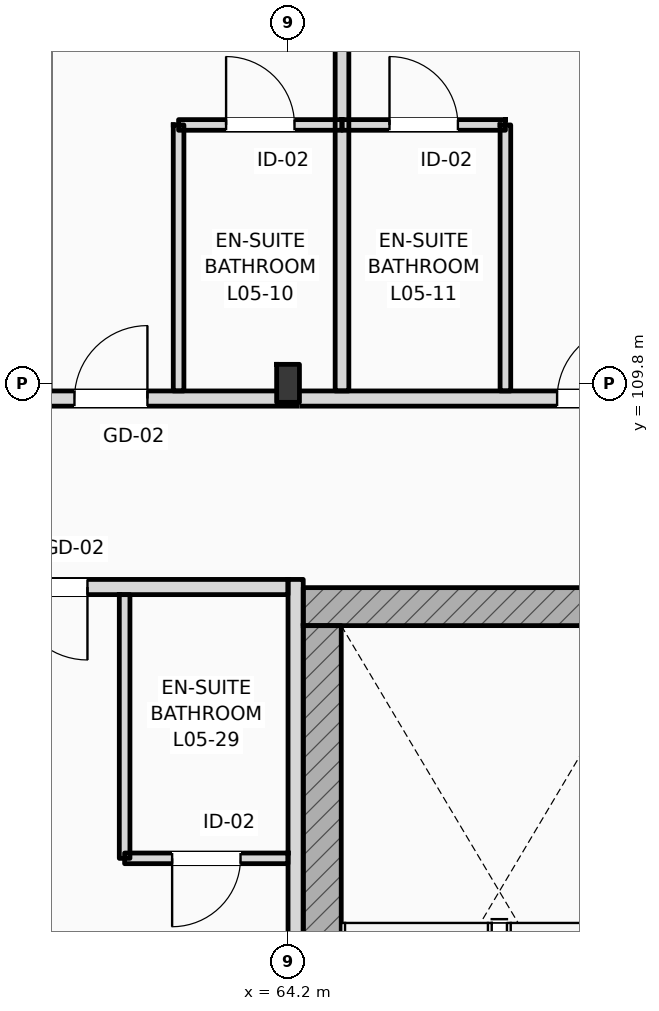
"""IFC4 building model, lengths in metres.
Left out: names, types, materials, properties, quantities, classifications, styles, units other than length and angle.
Written with IfcOpenShell. Run it as: python <this file> out.ifc"""

import sys

from ifc_helpers import new_model, si_unit, direction, frame, frame_2d, origin, origin_2d, place, context, subcontext, project, spatial, rectangle, i_section, extrude, element, fill, save


model = new_model("IFC4")
c1 = context("Model", 3, precision=1e-05, world=origin(), true_north=direction((0.0, 1.0)))
c2 = subcontext(c1, "Body", "Model", "MODEL_VIEW")
j1 = project(units=[si_unit("LENGTHUNIT", "METRE"), si_unit("PLANEANGLEUNIT", "RADIAN")], contexts=[c1])
p1 = place(None, origin())
s1 = spatial("IfcSite", under=j1, at=p1, CompositionType="ELEMENT")
p2 = place(p1, origin())
s2 = spatial("IfcBuilding", under=s1, at=p2, CompositionType="ELEMENT")
p3 = place(p2, frame((0.0, 0.0, 24.6)))
s3 = spatial("IfcBuildingStorey", under=s2, at=p3, CompositionType="ELEMENT", Elevation=24.6)
p4 = place(p3, frame((64.2, 109.8, 0.0), z_axis=(0.0, 0.0, 1.0), x_axis=(1.0, 0.0, 0.0)))
e1 = element("IfcColumn", 1, at=p4, inside=s3, PredefinedType="COLUMN", context=c2, shape_type="SweptSolid", body=[
    extrude(i_section(OverallWidth=0.3, OverallDepth=0.5, WebThickness=0.014, FlangeThickness=0.028, FilletRadius=0.027, at=origin_2d()), origin(), (0.0, 0.0, 1.0), 3.6),
])
p5 = place(p3, frame((64.4, 106.862, 0.0), z_axis=(0.0, 0.0, 1.0), x_axis=(1.0, 0.0, 0.0)))
e2 = element("IfcWall", 2, at=p5, inside=s3, PredefinedType="SHEAR", context=c2, shape_type="SweptSolid", body=[
    extrude(rectangle(XDim=5.16, YDim=0.5, at=frame_2d((2.58, 0.0))), origin(), (0.0, 0.0, 1.0), 3.6),
])
p6 = place(p3, frame((64.65, 97.5, 0.0), z_axis=(0.0, 0.0, 1.0), x_axis=(0.0, 1.0, 0.0)))
e3 = element("IfcWall", 3, at=p6, inside=s3, PredefinedType="SHEAR", context=c2, shape_type="SweptSolid", body=[
    extrude(rectangle(XDim=9.112, YDim=0.5, at=frame_2d((4.556, 0.0))), origin(), (0.0, 0.0, 1.0), 3.6),
])
p7 = place(p3, frame((10.65, 109.6, 0.0), z_axis=(0.0, 0.0, 1.0), x_axis=(1.0, 0.0, 0.0)))
e4 = element("IfcWall", 4, at=p7, inside=s3, PredefinedType="PARTITIONING", context=c2, shape_type="SweptSolid", body=[
    extrude(rectangle(XDim=109.21, YDim=0.2, at=frame_2d((54.605, 0.0))), origin(), (0.0, 0.0, 1.0), 2.78),
])
p8 = place(p7, frame((12.705, 0.0, 0.0)))
e5 = element("IfcOpeningElement", 5, at=p8, cuts=e4, PredefinedType="OPENING", context=c2, shape_type="SweptSolid", body=[
    extrude(rectangle(XDim=1.02, YDim=2.2, at=frame_2d((0.51, 1.1))), frame((0.0, 0.11, 0.0), z_axis=(0.0, -1.0, 0.0), x_axis=(1.0, 0.0, 0.0)), (0.0, 0.0, 1.0), 0.22),
])
p9 = place(p7, frame((19.26, 0.0, 0.0)))
e6 = element("IfcOpeningElement", 6, at=p9, cuts=e4, PredefinedType="OPENING", context=c2, shape_type="SweptSolid", body=[
    extrude(rectangle(XDim=1.02, YDim=2.2, at=frame_2d((0.51, 1.1))), frame((0.0, 0.11, 0.0), z_axis=(0.0, -1.0, 0.0), x_axis=(1.0, 0.0, 0.0)), (0.0, 0.0, 1.0), 0.22),
])
p10 = place(p7, frame((23.71, 0.0, 0.0)))
e7 = element("IfcOpeningElement", 7, at=p10, cuts=e4, PredefinedType="OPENING", context=c2, shape_type="SweptSolid", body=[
    extrude(rectangle(XDim=1.02, YDim=2.2, at=frame_2d((0.51, 1.1))), frame((0.0, 0.11, 0.0), z_axis=(0.0, -1.0, 0.0), x_axis=(1.0, 0.0, 0.0)), (0.0, 0.0, 1.0), 0.22),
])
p11 = place(p7, frame((27.66, 0.0, 0.0)))
e8 = element("IfcOpeningElement", 8, at=p11, cuts=e4, PredefinedType="OPENING", context=c2, shape_type="SweptSolid", body=[
    extrude(rectangle(XDim=1.02, YDim=2.2, at=frame_2d((0.51, 1.1))), frame((0.0, 0.11, 0.0), z_axis=(0.0, -1.0, 0.0), x_axis=(1.0, 0.0, 0.0)), (0.0, 0.0, 1.0), 0.22),
])
p12 = place(p7, frame((31.89, 0.0, 0.0)))
e9 = element("IfcOpeningElement", 9, at=p12, cuts=e4, PredefinedType="OPENING", context=c2, shape_type="SweptSolid", body=[
    extrude(rectangle(XDim=0.96, YDim=2.2, at=frame_2d((0.48, 1.1))), frame((0.0, 0.11, 0.0), z_axis=(0.0, -1.0, 0.0), x_axis=(1.0, 0.0, 0.0)), (0.0, 0.0, 1.0), 0.22),
])
p13 = place(p7, frame((33.94, 0.0, 0.0)))
e10 = element("IfcOpeningElement", 10, at=p13, cuts=e4, PredefinedType="OPENING", context=c2, shape_type="SweptSolid", body=[
    extrude(rectangle(XDim=0.96, YDim=2.2, at=frame_2d((0.48, 1.1))), frame((0.0, 0.11, 0.0), z_axis=(0.0, -1.0, 0.0), x_axis=(1.0, 0.0, 0.0)), (0.0, 0.0, 1.0), 0.22),
])
p14 = place(p7, frame((40.29, 0.0, 0.0)))
e11 = element("IfcOpeningElement", 11, at=p14, cuts=e4, PredefinedType="OPENING", context=c2, shape_type="SweptSolid", body=[
    extrude(rectangle(XDim=0.96, YDim=2.2, at=frame_2d((0.48, 1.1))), frame((0.0, 0.11, 0.0), z_axis=(0.0, -1.0, 0.0), x_axis=(1.0, 0.0, 0.0)), (0.0, 0.0, 1.0), 0.22),
])
p15 = place(p7, frame((42.34, 0.0, 0.0)))
e12 = element("IfcOpeningElement", 12, at=p15, cuts=e4, PredefinedType="OPENING", context=c2, shape_type="SweptSolid", body=[
    extrude(rectangle(XDim=0.96, YDim=2.2, at=frame_2d((0.48, 1.1))), frame((0.0, 0.11, 0.0), z_axis=(0.0, -1.0, 0.0), x_axis=(1.0, 0.0, 0.0)), (0.0, 0.0, 1.0), 0.22),
])
p16 = place(p7, frame((48.69, 0.0, 0.0)))
e13 = element("IfcOpeningElement", 13, at=p16, cuts=e4, PredefinedType="OPENING", context=c2, shape_type="SweptSolid", body=[
    extrude(rectangle(XDim=0.96, YDim=2.2, at=frame_2d((0.48, 1.1))), frame((0.0, 0.11, 0.0), z_axis=(0.0, -1.0, 0.0), x_axis=(1.0, 0.0, 0.0)), (0.0, 0.0, 1.0), 0.22),
])
p17 = place(p7, frame((50.74, 0.0, 0.0)))
e14 = element("IfcOpeningElement", 14, at=p17, cuts=e4, PredefinedType="OPENING", context=c2, shape_type="SweptSolid", body=[
    extrude(rectangle(XDim=0.96, YDim=2.2, at=frame_2d((0.48, 1.1))), frame((0.0, 0.11, 0.0), z_axis=(0.0, -1.0, 0.0), x_axis=(1.0, 0.0, 0.0)), (0.0, 0.0, 1.0), 0.22),
])
p18 = place(p7, frame((57.09, 0.0, 0.0)))
e15 = element("IfcOpeningElement", 15, at=p18, cuts=e4, PredefinedType="OPENING", context=c2, shape_type="SweptSolid", body=[
    extrude(rectangle(XDim=0.96, YDim=2.2, at=frame_2d((0.48, 1.1))), frame((0.0, 0.11, 0.0), z_axis=(0.0, -1.0, 0.0), x_axis=(1.0, 0.0, 0.0)), (0.0, 0.0, 1.0), 0.22),
])
p19 = place(p7, frame((59.14, 0.0, 0.0)))
e16 = element("IfcOpeningElement", 16, at=p19, cuts=e4, PredefinedType="OPENING", context=c2, shape_type="SweptSolid", body=[
    extrude(rectangle(XDim=0.96, YDim=2.2, at=frame_2d((0.48, 1.1))), frame((0.0, 0.11, 0.0), z_axis=(0.0, -1.0, 0.0), x_axis=(1.0, 0.0, 0.0)), (0.0, 0.0, 1.0), 0.22),
])
p20 = place(p7, frame((65.49, 0.0, 0.0)))
e17 = element("IfcOpeningElement", 17, at=p20, cuts=e4, PredefinedType="OPENING", context=c2, shape_type="SweptSolid", body=[
    extrude(rectangle(XDim=0.96, YDim=2.2, at=frame_2d((0.48, 1.1))), frame((0.0, 0.11, 0.0), z_axis=(0.0, -1.0, 0.0), x_axis=(1.0, 0.0, 0.0)), (0.0, 0.0, 1.0), 0.22),
])
p21 = place(p7, frame((67.54, 0.0, 0.0)))
e18 = element("IfcOpeningElement", 18, at=p21, cuts=e4, PredefinedType="OPENING", context=c2, shape_type="SweptSolid", body=[
    extrude(rectangle(XDim=0.96, YDim=2.2, at=frame_2d((0.48, 1.1))), frame((0.0, 0.11, 0.0), z_axis=(0.0, -1.0, 0.0), x_axis=(1.0, 0.0, 0.0)), (0.0, 0.0, 1.0), 0.22),
])
p22 = place(p7, frame((73.89, 0.0, 0.0)))
e19 = element("IfcOpeningElement", 19, at=p22, cuts=e4, PredefinedType="OPENING", context=c2, shape_type="SweptSolid", body=[
    extrude(rectangle(XDim=0.96, YDim=2.2, at=frame_2d((0.48, 1.1))), frame((0.0, 0.11, 0.0), z_axis=(0.0, -1.0, 0.0), x_axis=(1.0, 0.0, 0.0)), (0.0, 0.0, 1.0), 0.22),
])
p23 = place(p7, frame((78.09, 0.0, 0.0)))
e20 = element("IfcOpeningElement", 20, at=p23, cuts=e4, PredefinedType="OPENING", context=c2, shape_type="SweptSolid", body=[
    extrude(rectangle(XDim=0.96, YDim=2.2, at=frame_2d((0.48, 1.1))), frame((0.0, 0.11, 0.0), z_axis=(0.0, -1.0, 0.0), x_axis=(1.0, 0.0, 0.0)), (0.0, 0.0, 1.0), 0.22),
])
p24 = place(p7, frame((82.29, 0.0, 0.0)))
e21 = element("IfcOpeningElement", 21, at=p24, cuts=e4, PredefinedType="OPENING", context=c2, shape_type="SweptSolid", body=[
    extrude(rectangle(XDim=0.96, YDim=2.2, at=frame_2d((0.48, 1.1))), frame((0.0, 0.11, 0.0), z_axis=(0.0, -1.0, 0.0), x_axis=(1.0, 0.0, 0.0)), (0.0, 0.0, 1.0), 0.22),
])
p25 = place(p7, frame((86.49, 0.0, 0.0)))
e22 = element("IfcOpeningElement", 22, at=p25, cuts=e4, PredefinedType="OPENING", context=c2, shape_type="SweptSolid", body=[
    extrude(rectangle(XDim=0.96, YDim=2.2, at=frame_2d((0.48, 1.1))), frame((0.0, 0.11, 0.0), z_axis=(0.0, -1.0, 0.0), x_axis=(1.0, 0.0, 0.0)), (0.0, 0.0, 1.0), 0.22),
])
p26 = place(p7, frame((88.54, 0.0, 0.0)))
e23 = element("IfcOpeningElement", 23, at=p26, cuts=e4, PredefinedType="OPENING", context=c2, shape_type="SweptSolid", body=[
    extrude(rectangle(XDim=0.96, YDim=2.2, at=frame_2d((0.48, 1.1))), frame((0.0, 0.11, 0.0), z_axis=(0.0, -1.0, 0.0), x_axis=(1.0, 0.0, 0.0)), (0.0, 0.0, 1.0), 0.22),
])
p27 = place(p7, frame((94.89, 0.0, 0.0)))
e24 = element("IfcOpeningElement", 24, at=p27, cuts=e4, PredefinedType="OPENING", context=c2, shape_type="SweptSolid", body=[
    extrude(rectangle(XDim=0.96, YDim=2.2, at=frame_2d((0.48, 1.1))), frame((0.0, 0.11, 0.0), z_axis=(0.0, -1.0, 0.0), x_axis=(1.0, 0.0, 0.0)), (0.0, 0.0, 1.0), 0.22),
])
p28 = place(p7, frame((96.94, 0.0, 0.0)))
e25 = element("IfcOpeningElement", 25, at=p28, cuts=e4, PredefinedType="OPENING", context=c2, shape_type="SweptSolid", body=[
    extrude(rectangle(XDim=0.96, YDim=2.2, at=frame_2d((0.48, 1.1))), frame((0.0, 0.11, 0.0), z_axis=(0.0, -1.0, 0.0), x_axis=(1.0, 0.0, 0.0)), (0.0, 0.0, 1.0), 0.22),
])
p29 = place(p7, frame((103.29, 0.0, 0.0)))
e26 = element("IfcOpeningElement", 26, at=p29, cuts=e4, PredefinedType="OPENING", context=c2, shape_type="SweptSolid", body=[
    extrude(rectangle(XDim=0.96, YDim=2.2, at=frame_2d((0.48, 1.1))), frame((0.0, 0.11, 0.0), z_axis=(0.0, -1.0, 0.0), x_axis=(1.0, 0.0, 0.0)), (0.0, 0.0, 1.0), 0.22),
])
p30 = place(p7, frame((105.25, 0.0, 0.0)))
e27 = element("IfcOpeningElement", 27, at=p30, cuts=e4, PredefinedType="OPENING", context=c2, shape_type="SweptSolid", body=[
    extrude(rectangle(XDim=0.96, YDim=2.2, at=frame_2d((0.48, 1.1))), frame((0.0, 0.11, 0.0), z_axis=(0.0, -1.0, 0.0), x_axis=(1.0, 0.0, 0.0)), (0.0, 0.0, 1.0), 0.22),
])
p31 = place(p7, frame((2.716, 0.0, 0.0)))
e28 = element("IfcOpeningElement", 28, at=p31, cuts=e4, PredefinedType="OPENING", context=c2, shape_type="SweptSolid", body=[
    extrude(rectangle(XDim=1.35, YDim=2.25, at=frame_2d((0.675, 1.125))), frame((0.0, 0.11, 0.0), z_axis=(0.0, -1.0, 0.0), x_axis=(1.0, 0.0, 0.0)), (0.0, 0.0, 1.0), 0.22),
])
p32 = place(p7, frame((6.65, 0.0, 0.0)))
e29 = element("IfcOpeningElement", 29, at=p32, cuts=e4, PredefinedType="OPENING", context=c2, shape_type="SweptSolid", body=[
    extrude(rectangle(XDim=1.35, YDim=2.25, at=frame_2d((0.675, 1.125))), frame((0.0, 0.11, 0.0), z_axis=(0.0, -1.0, 0.0), x_axis=(1.0, 0.0, 0.0)), (0.0, 0.0, 1.0), 0.22),
])
p33 = place(p7, frame((10.583, 0.0, 0.0)))
e30 = element("IfcOpeningElement", 30, at=p33, cuts=e4, PredefinedType="OPENING", context=c2, shape_type="SweptSolid", body=[
    extrude(rectangle(XDim=1.35, YDim=2.25, at=frame_2d((0.675, 1.125))), frame((0.0, 0.11, 0.0), z_axis=(0.0, -1.0, 0.0), x_axis=(1.0, 0.0, 0.0)), (0.0, 0.0, 1.0), 0.22),
])
p34 = place(p3, frame((40.76, 107.12, 0.0), z_axis=(0.0, 0.0, 1.0), x_axis=(1.0, 0.0, 0.0)))
e31 = element("IfcWall", 31, at=p34, inside=s3, PredefinedType="PARTITIONING", context=c2, shape_type="SweptSolid", body=[
    extrude(rectangle(XDim=23.44, YDim=0.2, at=frame_2d((11.72, 0.0))), origin(), (0.0, 0.0, 1.0), 3.34),
])
p35 = place(p34, frame((2.449, 0.0, 0.0)))
e32 = element("IfcOpeningElement", 32, at=p35, cuts=e31, PredefinedType="OPENING", context=c2, shape_type="SweptSolid", body=[
    extrude(rectangle(XDim=0.96, YDim=2.2, at=frame_2d((0.48, 1.1))), frame((0.0, 0.11, 0.0), z_axis=(0.0, -1.0, 0.0), x_axis=(1.0, 0.0, 0.0)), (0.0, 0.0, 1.0), 0.22),
])
p36 = place(p34, frame((4.253, 0.0, 0.0)))
e33 = element("IfcOpeningElement", 33, at=p36, cuts=e31, PredefinedType="OPENING", context=c2, shape_type="SweptSolid", body=[
    extrude(rectangle(XDim=0.96, YDim=2.2, at=frame_2d((0.48, 1.1))), frame((0.0, 0.11, 0.0), z_axis=(0.0, -1.0, 0.0), x_axis=(1.0, 0.0, 0.0)), (0.0, 0.0, 1.0), 0.22),
])
p37 = place(p34, frame((10.311, 0.0, 0.0)))
e34 = element("IfcOpeningElement", 34, at=p37, cuts=e31, PredefinedType="OPENING", context=c2, shape_type="SweptSolid", body=[
    extrude(rectangle(XDim=0.96, YDim=2.2, at=frame_2d((0.48, 1.1))), frame((0.0, 0.11, 0.0), z_axis=(0.0, -1.0, 0.0), x_axis=(1.0, 0.0, 0.0)), (0.0, 0.0, 1.0), 0.22),
])
p38 = place(p34, frame((12.069, 0.0, 0.0)))
e35 = element("IfcOpeningElement", 35, at=p38, cuts=e31, PredefinedType="OPENING", context=c2, shape_type="SweptSolid", body=[
    extrude(rectangle(XDim=0.96, YDim=2.2, at=frame_2d((0.48, 1.1))), frame((0.0, 0.11, 0.0), z_axis=(0.0, -1.0, 0.0), x_axis=(1.0, 0.0, 0.0)), (0.0, 0.0, 1.0), 0.22),
])
p39 = place(p34, frame((18.128, 0.0, 0.0)))
e36 = element("IfcOpeningElement", 36, at=p39, cuts=e31, PredefinedType="OPENING", context=c2, shape_type="SweptSolid", body=[
    extrude(rectangle(XDim=0.96, YDim=2.2, at=frame_2d((0.48, 1.1))), frame((0.0, 0.11, 0.0), z_axis=(0.0, -1.0, 0.0), x_axis=(1.0, 0.0, 0.0)), (0.0, 0.0, 1.0), 0.22),
])
p40 = place(p34, frame((19.841, 0.0, 0.0)))
e37 = element("IfcOpeningElement", 37, at=p40, cuts=e31, PredefinedType="OPENING", context=c2, shape_type="SweptSolid", body=[
    extrude(rectangle(XDim=0.96, YDim=2.2, at=frame_2d((0.48, 1.1))), frame((0.0, 0.11, 0.0), z_axis=(0.0, -1.0, 0.0), x_axis=(1.0, 0.0, 0.0)), (0.0, 0.0, 1.0), 0.22),
])
p41 = place(p3, frame((64.3, 96.14, 0.0), z_axis=(0.0, 0.0, 1.0), x_axis=(0.0, 1.0, 0.0)))
e38 = element("IfcWall", 38, at=p41, inside=s3, PredefinedType="PARTITIONING", context=c2, shape_type="SweptSolid", body=[
    extrude(rectangle(XDim=11.08, YDim=0.2, at=frame_2d((5.54, 0.0))), origin(), (0.0, 0.0, 1.0), 2.93),
])
p42 = place(p3, frame((64.91, 109.7, 0.0), z_axis=(0.0, 0.0, 1.0), x_axis=(0.0, 1.0, 0.0)))
e39 = element("IfcWall", 39, at=p42, inside=s3, PredefinedType="PARTITIONING", context=c2, shape_type="SweptSolid", body=[
    extrude(rectangle(XDim=8.15, YDim=0.18, at=frame_2d((4.075, 0.0))), origin(), (0.0, 0.0, 1.0), 3.34),
])
p43 = place(p3, frame((62.76, 109.7, 0.0), z_axis=(0.0, 0.0, 1.0), x_axis=(0.0, 1.0, 0.0)))
e40 = element("IfcWall", 40, at=p43, inside=s3, PredefinedType="PARTITIONING", context=c2, shape_type="SweptSolid", body=[
    extrude(rectangle(XDim=3.5, YDim=0.14, at=frame_2d((1.75, 0.0))), origin(), (0.0, 0.0, 1.0), 3.34),
])
p44 = place(p3, frame((62.76, 113.2, 0.0), z_axis=(0.0, 0.0, 1.0), x_axis=(1.0, 0.0, 0.0)))
e41 = element("IfcWall", 41, at=p44, inside=s3, PredefinedType="PARTITIONING", context=c2, shape_type="SweptSolid", body=[
    extrude(rectangle(XDim=2.15, YDim=0.14, at=frame_2d((1.075, 0.0))), origin(), (0.0, 0.0, 1.0), 3.34),
])
p45 = place(p44, frame((0.625, 0.0, 0.0)))
e42 = element("IfcOpeningElement", 42, at=p45, cuts=e41, PredefinedType="OPENING", context=c2, shape_type="SweptSolid", body=[
    extrude(rectangle(XDim=0.9, YDim=2.1, at=frame_2d((0.45, 1.05))), frame((0.0, 0.08, 0.0), z_axis=(0.0, -1.0, 0.0), x_axis=(1.0, 0.0, 0.0)), (0.0, 0.0, 1.0), 0.16),
])
p46 = place(p3, frame((67.06, 109.7, 0.0), z_axis=(0.0, 0.0, 1.0), x_axis=(0.0, 1.0, 0.0)))
e43 = element("IfcWall", 43, at=p46, inside=s3, PredefinedType="PARTITIONING", context=c2, shape_type="SweptSolid", body=[
    extrude(rectangle(XDim=3.5, YDim=0.14, at=frame_2d((1.75, 0.0))), origin(), (0.0, 0.0, 1.0), 3.34),
])
p47 = place(p3, frame((64.91, 113.2, 0.0), z_axis=(0.0, 0.0, 1.0), x_axis=(1.0, 0.0, 0.0)))
e44 = element("IfcWall", 44, at=p47, inside=s3, PredefinedType="PARTITIONING", context=c2, shape_type="SweptSolid", body=[
    extrude(rectangle(XDim=2.15, YDim=0.14, at=frame_2d((1.075, 0.0))), origin(), (0.0, 0.0, 1.0), 3.34),
])
p48 = place(p47, frame((0.625, 0.0, 0.0)))
e45 = element("IfcOpeningElement", 45, at=p48, cuts=e44, PredefinedType="OPENING", context=c2, shape_type="SweptSolid", body=[
    extrude(rectangle(XDim=0.9, YDim=2.1, at=frame_2d((0.45, 1.05))), frame((0.0, 0.08, 0.0), z_axis=(0.0, -1.0, 0.0), x_axis=(1.0, 0.0, 0.0)), (0.0, 0.0, 1.0), 0.16),
])
p49 = place(p3, frame((62.05, 103.55, 0.0), z_axis=(0.0, 0.0, 1.0), x_axis=(0.0, 1.0, 0.0)))
e46 = element("IfcWall", 46, at=p49, inside=s3, PredefinedType="PARTITIONING", context=c2, shape_type="SweptSolid", body=[
    extrude(rectangle(XDim=3.47, YDim=0.14, at=frame_2d((1.735, 0.0))), origin(), (0.0, 0.0, 1.0), 3.34),
])
p50 = place(p3, frame((62.05, 103.55, 0.0), z_axis=(0.0, 0.0, 1.0), x_axis=(1.0, 0.0, 0.0)))
e47 = element("IfcWall", 47, at=p50, inside=s3, PredefinedType="PARTITIONING", context=c2, shape_type="SweptSolid", body=[
    extrude(rectangle(XDim=2.15, YDim=0.14, at=frame_2d((1.075, 0.0))), origin(), (0.0, 0.0, 1.0), 3.34),
])
p51 = place(p50, frame((0.625, 0.0, 0.0)))
e48 = element("IfcOpeningElement", 48, at=p51, cuts=e47, PredefinedType="OPENING", context=c2, shape_type="SweptSolid", body=[
    extrude(rectangle(XDim=0.9, YDim=2.1, at=frame_2d((0.45, 1.05))), frame((0.0, 0.08, 0.0), z_axis=(0.0, -1.0, 0.0), x_axis=(1.0, 0.0, 0.0)), (0.0, 0.0, 1.0), 0.16),
])
p52 = place(p17, origin())
e49 = element("IfcDoor", 49, at=p52, inside=s3, OperationType="SINGLE_SWING_RIGHT", PredefinedType="DOOR", context=c2, shape_type="SweptSolid", body=[
    extrude(rectangle(XDim=0.96, YDim=2.2, at=frame_2d((0.48, 1.1))), frame((0.0, 0.025, 0.0), z_axis=(0.0, -1.0, 0.0), x_axis=(1.0, 0.0, 0.0)), (0.0, 0.0, 1.0), 0.05),
])
fill(e14, e49)
p53 = place(p45, origin())
e50 = element("IfcDoor", 50, at=p53, inside=s3, OperationType="SINGLE_SWING_LEFT", PredefinedType="DOOR", context=c2, shape_type="SweptSolid", body=[
    extrude(rectangle(XDim=0.9, YDim=2.1, at=frame_2d((0.45, 1.05))), frame((0.0, 0.025, 0.0), z_axis=(0.0, -1.0, 0.0), x_axis=(1.0, 0.0, 0.0)), (0.0, 0.0, 1.0), 0.05),
])
fill(e42, e50)
p54 = place(p18, origin())
e51 = element("IfcDoor", 51, at=p54, inside=s3, OperationType="SINGLE_SWING_RIGHT", PredefinedType="DOOR", context=c2, shape_type="SweptSolid", body=[
    extrude(rectangle(XDim=0.96, YDim=2.2, at=frame_2d((0.48, 1.1))), frame((0.0, 0.025, 0.0), z_axis=(0.0, -1.0, 0.0), x_axis=(1.0, 0.0, 0.0)), (0.0, 0.0, 1.0), 0.05),
])
fill(e15, e51)
p55 = place(p48, origin())
e52 = element("IfcDoor", 52, at=p55, inside=s3, OperationType="SINGLE_SWING_LEFT", PredefinedType="DOOR", context=c2, shape_type="SweptSolid", body=[
    extrude(rectangle(XDim=0.9, YDim=2.1, at=frame_2d((0.45, 1.05))), frame((0.0, 0.025, 0.0), z_axis=(0.0, -1.0, 0.0), x_axis=(1.0, 0.0, 0.0)), (0.0, 0.0, 1.0), 0.05),
])
fill(e45, e52)
p56 = place(p40, frame((0.96, 0.0, 0.0), z_axis=(0.0, 0.0, 1.0), x_axis=(-1.0, 0.0, 0.0)))
e53 = element("IfcDoor", 53, at=p56, inside=s3, OperationType="SINGLE_SWING_RIGHT", PredefinedType="DOOR", context=c2, shape_type="SweptSolid", body=[
    extrude(rectangle(XDim=0.96, YDim=2.2, at=frame_2d((0.48, 1.1))), frame((0.0, 0.025, 0.0), z_axis=(0.0, -1.0, 0.0), x_axis=(1.0, 0.0, 0.0)), (0.0, 0.0, 1.0), 0.05),
])
fill(e37, e53)
p57 = place(p51, frame((0.9, 0.0, 0.0), z_axis=(0.0, 0.0, 1.0), x_axis=(-1.0, 0.0, 0.0)))
e54 = element("IfcDoor", 54, at=p57, inside=s3, OperationType="SINGLE_SWING_LEFT", PredefinedType="DOOR", context=c2, shape_type="SweptSolid", body=[
    extrude(rectangle(XDim=0.9, YDim=2.1, at=frame_2d((0.45, 1.05))), frame((0.0, 0.025, 0.0), z_axis=(0.0, -1.0, 0.0), x_axis=(1.0, 0.0, 0.0)), (0.0, 0.0, 1.0), 0.05),
])
fill(e48, e54)
save(model, sys.argv[1])
